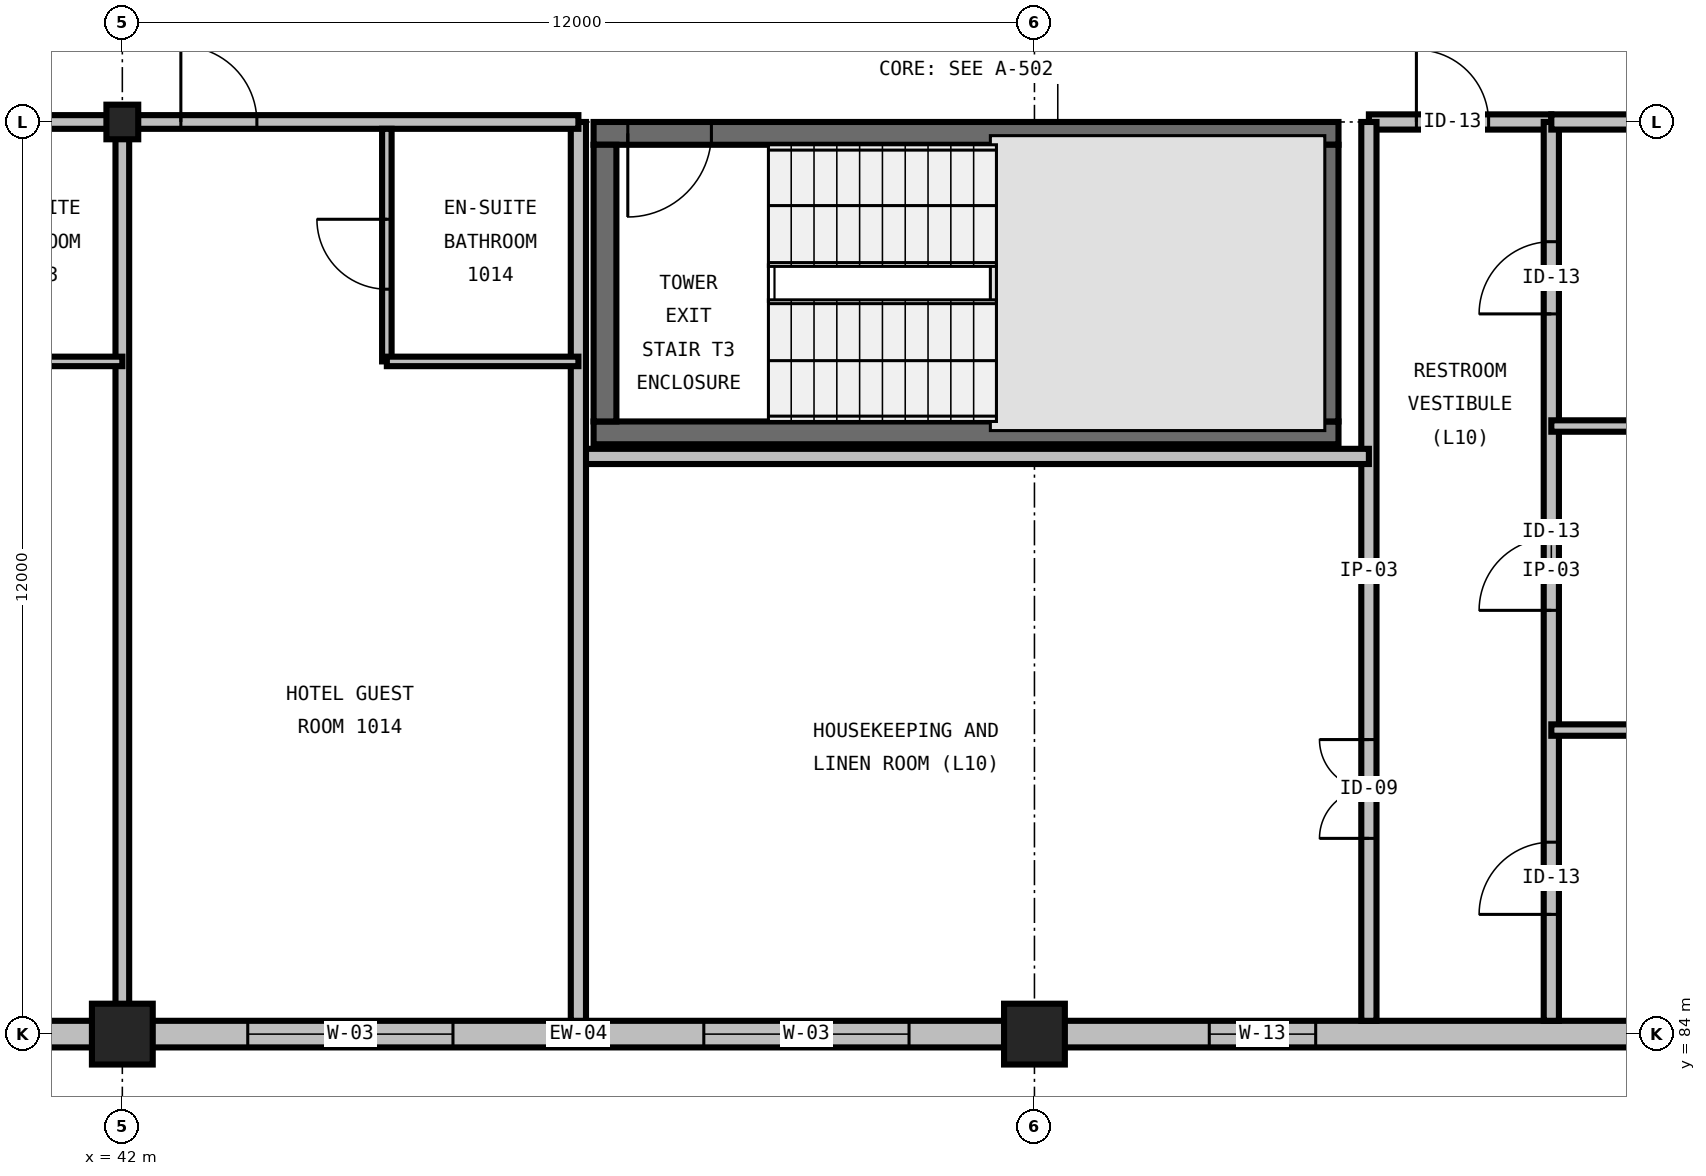
"""IFC4 building model, lengths in metres.
Left out: names, types, materials, properties, quantities, classifications, styles, units other than length and angle.
Written with IfcOpenShell. Run it as: python <this file> out.ifc"""

import sys

from ifc_helpers import new_model, si_unit, direction, frame, frame_2d, origin, origin_2d, place, context, subcontext, project, spatial, rectangle, i_section, extrude, element, fill, save


model = new_model("IFC4")
c1 = context("Model", 3, precision=1e-05, world=origin(), true_north=direction((0.0, 1.0)))
c2 = subcontext(c1, "Body", "Model", "MODEL_VIEW")
j1 = project(units=[si_unit("LENGTHUNIT", "METRE"), si_unit("PLANEANGLEUNIT", "RADIAN")], contexts=[c1])
p1 = place(None, origin())
s1 = spatial("IfcSite", under=j1, at=p1, CompositionType="ELEMENT")
p2 = place(p1, origin())
s2 = spatial("IfcBuilding", under=s1, at=p2, CompositionType="ELEMENT")
p3 = place(p2, frame((0.0, 0.0, 45.6)))
s3 = spatial("IfcBuildingStorey", under=s2, at=p3, CompositionType="ELEMENT", Elevation=45.6)
p4 = place(p3, frame((42.0, 84.0, 0.0), z_axis=(0.0, 0.0, 1.0), x_axis=(1.0, 0.0, 0.0)))
e1 = element("IfcColumn", 1, at=p4, inside=s3, PredefinedType="COLUMN", context=c2, shape_type="SweptSolid", body=[
    extrude(rectangle(XDim=0.8, YDim=0.8, at=origin_2d()), origin(), (0.0, 0.0, 1.0), 3.6),
])
p5 = place(p3, frame((42.0, 96.0, 0.0), z_axis=(0.0, 0.0, 1.0), x_axis=(1.0, 0.0, 0.0)))
e2 = element("IfcColumn", 2, at=p5, inside=s3, PredefinedType="COLUMN", context=c2, shape_type="SweptSolid", body=[
    extrude(i_section(OverallWidth=0.419, OverallDepth=0.455, WebThickness=0.042, FlangeThickness=0.068, FilletRadius=0.031, at=origin_2d()), origin(), (0.0, 0.0, 1.0), 3.6),
])
p6 = place(p3, frame((54.0, 84.0, 0.0), z_axis=(0.0, 0.0, 1.0), x_axis=(1.0, 0.0, 0.0)))
e3 = element("IfcColumn", 3, at=p6, inside=s3, PredefinedType="COLUMN", context=c2, shape_type="SweptSolid", body=[
    extrude(rectangle(XDim=0.8, YDim=0.8, at=origin_2d()), origin(), (0.0, 0.0, 1.0), 3.6),
])
p7 = place(p3, frame((48.2, 91.91, 0.0), z_axis=(0.0, 0.0, 1.0), x_axis=(1.0, 0.0, 0.0)))
e4 = element("IfcWall", 4, at=p7, inside=s3, PredefinedType="SHEAR", context=c2, shape_type="SweptSolid", body=[
    extrude(rectangle(XDim=9.8, YDim=0.3, at=frame_2d((4.9, 0.0))), origin(), (0.0, 0.0, 1.0), 3.6),
])
p8 = place(p3, frame((58.0, 95.85, 0.0), z_axis=(0.0, 0.0, 1.0), x_axis=(-1.0, 0.0, 0.0)))
e5 = element("IfcWall", 5, at=p8, inside=s3, PredefinedType="SHEAR", context=c2, shape_type="SweptSolid", body=[
    extrude(rectangle(XDim=9.8, YDim=0.3, at=frame_2d((4.9, 0.0))), origin(), (0.0, 0.0, 1.0), 3.6),
])
p9 = place(p8, frame((8.25, 0.0, 0.0)))
e6 = element("IfcOpeningElement", 6, at=p9, cuts=e5, PredefinedType="OPENING", context=c2, shape_type="SweptSolid", body=[
    extrude(rectangle(XDim=1.1, YDim=2.2, at=frame_2d((0.55, 1.1))), frame((0.0, 0.165, 0.0), z_axis=(0.0, -1.0, 0.0), x_axis=(1.0, 0.0, 0.0)), (0.0, 0.0, 1.0), 0.33),
])
for number, where, z_axis, x_axis in (
    (7, (48.35, 95.7, 0.0), (0.0, 0.0, 1.0), (0.0, -1.0, 0.0)),
    (8, (57.85, 92.06, 0.0), (0.0, 0.0, 1.0), (0.0, 1.0, 0.0)),
):
    element("IfcWall", number, at=place(p3, frame(where, z_axis=z_axis, x_axis=x_axis)), inside=s3, PredefinedType="SHEAR", context=c2, shape_type="SweptSolid", body=[
        extrude(rectangle(XDim=3.64, YDim=0.3, at=frame_2d((1.82, 0.0))), origin(), (0.0, 0.0, 1.0), 3.6),
    ])
p10 = place(p3, frame((36.0, 84.0, 0.0), z_axis=(0.0, 0.0, 1.0), x_axis=(1.0, 0.0, 0.0)))
e9 = element("IfcWall", 9, at=p10, inside=s3, PredefinedType="STANDARD", context=c2, shape_type="SweptSolid", body=[
    extrude(rectangle(XDim=6.0, YDim=0.35, at=frame_2d((3.0, 0.0))), origin(), (0.0, 0.0, 1.0), 2.486),
])
p11 = place(p10, frame((1.65, 0.0, 0.72)))
e10 = element("IfcOpeningElement", 10, at=p11, cuts=e9, PredefinedType="OPENING", context=c2, shape_type="SweptSolid", body=[
    extrude(rectangle(XDim=2.7, YDim=1.65, at=frame_2d((1.35, 0.825))), frame((0.0, 0.19, 0.0), z_axis=(0.0, -1.0, 0.0), x_axis=(1.0, 0.0, 0.0)), (0.0, 0.0, 1.0), 0.38),
])
p12 = place(p3, frame((42.0, 84.0, 0.0), z_axis=(0.0, 0.0, 1.0), x_axis=(1.0, 0.0, 0.0)))
e11 = element("IfcWall", 11, at=p12, inside=s3, PredefinedType="STANDARD", context=c2, shape_type="SweptSolid", body=[
    extrude(rectangle(XDim=12.0, YDim=0.35, at=frame_2d((6.0, 0.0))), origin(), (0.0, 0.0, 1.0), 2.486),
])
p13 = place(p12, frame((1.65, 0.0, 0.72)))
e12 = element("IfcOpeningElement", 12, at=p13, cuts=e11, PredefinedType="OPENING", context=c2, shape_type="SweptSolid", body=[
    extrude(rectangle(XDim=2.7, YDim=1.65, at=frame_2d((1.35, 0.825))), frame((0.0, 0.19, 0.0), z_axis=(0.0, -1.0, 0.0), x_axis=(1.0, 0.0, 0.0)), (0.0, 0.0, 1.0), 0.38),
])
p14 = place(p12, frame((7.65, 0.0, 0.72)))
e13 = element("IfcOpeningElement", 13, at=p14, cuts=e11, PredefinedType="OPENING", context=c2, shape_type="SweptSolid", body=[
    extrude(rectangle(XDim=2.7, YDim=1.65, at=frame_2d((1.35, 0.825))), frame((0.0, 0.19, 0.0), z_axis=(0.0, -1.0, 0.0), x_axis=(1.0, 0.0, 0.0)), (0.0, 0.0, 1.0), 0.38),
])
p15 = place(p3, frame((54.0, 84.0, 0.0), z_axis=(0.0, 0.0, 1.0), x_axis=(1.0, 0.0, 0.0)))
e14 = element("IfcWall", 14, at=p15, inside=s3, PredefinedType="STANDARD", context=c2, shape_type="SweptSolid", body=[
    extrude(rectangle(XDim=12.0, YDim=0.35, at=frame_2d((6.0, 0.0))), origin(), (0.0, 0.0, 1.0), 2.486),
])
p16 = place(p15, frame((2.3, 0.0, 1.0)))
e15 = element("IfcOpeningElement", 15, at=p16, cuts=e14, PredefinedType="OPENING", context=c2, shape_type="SweptSolid", body=[
    extrude(rectangle(XDim=1.4, YDim=1.4, at=frame_2d((0.7, 0.7))), frame((0.0, 0.19, 0.0), z_axis=(0.0, -1.0, 0.0), x_axis=(1.0, 0.0, 0.0)), (0.0, 0.0, 1.0), 0.38),
])
p17 = place(p15, frame((8.25, 0.0, 1.0)))
e16 = element("IfcOpeningElement", 16, at=p17, cuts=e14, PredefinedType="OPENING", context=c2, shape_type="SweptSolid", body=[
    extrude(rectangle(XDim=1.5, YDim=1.35, at=frame_2d((0.75, 0.675))), frame((0.0, 0.19, 0.0), z_axis=(0.0, -1.0, 0.0), x_axis=(1.0, 0.0, 0.0)), (0.0, 0.0, 1.0), 0.38),
])
p18 = place(p3, frame((58.4, 96.0, 0.0), z_axis=(0.0, 0.0, 1.0), x_axis=(1.0, 0.0, 0.0)))
e17 = element("IfcWall", 17, at=p18, inside=s3, PredefinedType="PARTITIONING", context=c2, shape_type="SweptSolid", body=[
    extrude(rectangle(XDim=2.4, YDim=0.2, at=frame_2d((1.2, 0.0))), origin(), (0.0, 0.0, 1.0), 2.359),
])
p19 = place(p18, frame((0.625, 0.0, 0.0)))
e18 = element("IfcOpeningElement", 18, at=p19, cuts=e17, PredefinedType="OPENING", context=c2, shape_type="SweptSolid", body=[
    extrude(rectangle(XDim=0.95, YDim=2.15, at=frame_2d((0.475, 1.075))), frame((0.0, 0.115, 0.0), z_axis=(0.0, -1.0, 0.0), x_axis=(1.0, 0.0, 0.0)), (0.0, 0.0, 1.0), 0.23),
])
p20 = place(p3, frame((58.4, 84.175, 0.0), z_axis=(0.0, 0.0, 1.0), x_axis=(0.0, 1.0, 0.0)))
e19 = element("IfcWall", 19, at=p20, inside=s3, PredefinedType="PARTITIONING", context=c2, shape_type="SweptSolid", body=[
    extrude(rectangle(XDim=11.825, YDim=0.2, at=frame_2d((5.913, 0.0))), origin(), (0.0, 0.0, 1.0), 3.29),
])
p21 = place(p20, frame((2.4, 0.0, 0.0)))
e20 = element("IfcOpeningElement", 20, at=p21, cuts=e19, PredefinedType="OPENING", context=c2, shape_type="SweptSolid", body=[
    extrude(rectangle(XDim=1.3, YDim=2.2, at=frame_2d((0.65, 1.1))), frame((0.0, 0.115, 0.0), z_axis=(0.0, -1.0, 0.0), x_axis=(1.0, 0.0, 0.0)), (0.0, 0.0, 1.0), 0.23),
])
p22 = place(p3, frame((60.8, 84.175, 0.0), z_axis=(0.0, 0.0, 1.0), x_axis=(0.0, 1.0, 0.0)))
e21 = element("IfcWall", 21, at=p22, inside=s3, PredefinedType="PARTITIONING", context=c2, shape_type="SweptSolid", body=[
    extrude(rectangle(XDim=11.825, YDim=0.2, at=frame_2d((5.913, 0.0))), origin(), (0.0, 0.0, 1.0), 3.29),
])
p23 = place(p22, frame((1.4, 0.0, 0.0)))
e22 = element("IfcOpeningElement", 22, at=p23, cuts=e21, PredefinedType="OPENING", context=c2, shape_type="SweptSolid", body=[
    extrude(rectangle(XDim=0.95, YDim=2.15, at=frame_2d((0.475, 1.075))), frame((0.0, 0.115, 0.0), z_axis=(0.0, -1.0, 0.0), x_axis=(1.0, 0.0, 0.0)), (0.0, 0.0, 1.0), 0.23),
])
p24 = place(p22, frame((5.4, 0.0, 0.0)))
e23 = element("IfcOpeningElement", 23, at=p24, cuts=e21, PredefinedType="OPENING", context=c2, shape_type="SweptSolid", body=[
    extrude(rectangle(XDim=0.95, YDim=2.15, at=frame_2d((0.475, 1.075))), frame((0.0, 0.115, 0.0), z_axis=(0.0, -1.0, 0.0), x_axis=(1.0, 0.0, 0.0)), (0.0, 0.0, 1.0), 0.23),
])
p25 = place(p22, frame((9.3, 0.0, 0.0)))
e24 = element("IfcOpeningElement", 24, at=p25, cuts=e21, PredefinedType="OPENING", context=c2, shape_type="SweptSolid", body=[
    extrude(rectangle(XDim=0.95, YDim=2.15, at=frame_2d((0.475, 1.075))), frame((0.0, 0.115, 0.0), z_axis=(0.0, -1.0, 0.0), x_axis=(1.0, 0.0, 0.0)), (0.0, 0.0, 1.0), 0.23),
])
p26 = place(p3, frame((60.8, 96.0, 0.0), z_axis=(0.0, 0.0, 1.0), x_axis=(1.0, 0.0, 0.0)))
e25 = element("IfcWall", 25, at=p26, inside=s3, PredefinedType="PARTITIONING", context=c2, shape_type="SweptSolid", body=[
    extrude(rectangle(XDim=5.2, YDim=0.2, at=frame_2d((2.6, 0.0))), origin(), (0.0, 0.0, 1.0), 2.359),
])
for number, where, z_axis, x_axis in (
    (26, (60.8, 88.0, 0.0), (0.0, 0.0, 1.0), (1.0, 0.0, 0.0)),
    (27, (60.8, 92.0, 0.0), (0.0, 0.0, 1.0), (1.0, 0.0, 0.0)),
):
    element("IfcWall", number, at=place(p3, frame(where, z_axis=z_axis, x_axis=x_axis)), inside=s3, PredefinedType="PARTITIONING", context=c2, shape_type="SweptSolid", body=[
        extrude(rectangle(XDim=5.2, YDim=0.15, at=frame_2d((2.6, 0.0))), origin(), (0.0, 0.0, 1.0), 3.29),
    ])
p27 = place(p3, frame((48.0, 91.6, 0.0), z_axis=(0.0, 0.0, 1.0), x_axis=(1.0, 0.0, 0.0)))
e28 = element("IfcWall", 28, at=p27, inside=s3, PredefinedType="PARTITIONING", context=c2, shape_type="SweptSolid", body=[
    extrude(rectangle(XDim=10.4, YDim=0.2, at=frame_2d((5.2, 0.0))), origin(), (0.0, 0.0, 1.0), 3.29),
])
p28 = place(p3, frame((48.0, 84.175, 0.0), z_axis=(0.0, 0.0, 1.0), x_axis=(0.0, 1.0, 0.0)))
e29 = element("IfcWall", 29, at=p28, inside=s3, PredefinedType="PARTITIONING", context=c2, shape_type="SweptSolid", body=[
    extrude(rectangle(XDim=11.825, YDim=0.2, at=frame_2d((5.913, 0.0))), origin(), (0.0, 0.0, 1.0), 3.29),
])
p29 = place(p3, frame((36.0, 96.0, 0.0), z_axis=(0.0, 0.0, 1.0), x_axis=(1.0, 0.0, 0.0)))
e30 = element("IfcWall", 30, at=p29, inside=s3, PredefinedType="PARTITIONING", context=c2, shape_type="SweptSolid", body=[
    extrude(rectangle(XDim=6.0, YDim=0.18, at=frame_2d((3.0, 0.0))), origin(), (0.0, 0.0, 1.0), 2.736),
])
p30 = place(p29, frame((0.77, 0.0, 0.0)))
e31 = element("IfcOpeningElement", 31, at=p30, cuts=e30, PredefinedType="OPENING", context=c2, shape_type="SweptSolid", body=[
    extrude(rectangle(XDim=1.0, YDim=2.15, at=frame_2d((0.5, 1.075))), frame((0.0, 0.105, 0.0), z_axis=(0.0, -1.0, 0.0), x_axis=(1.0, 0.0, 0.0)), (0.0, 0.0, 1.0), 0.21),
])
p31 = place(p3, frame((42.0, 84.175, 0.0), z_axis=(0.0, 0.0, 1.0), x_axis=(0.0, 1.0, 0.0)))
e32 = element("IfcWall", 32, at=p31, inside=s3, PredefinedType="PARTITIONING", context=c2, shape_type="SweptSolid", body=[
    extrude(rectangle(XDim=11.825, YDim=0.18, at=frame_2d((5.913, 0.0))), origin(), (0.0, 0.0, 1.0), 2.59),
])
p32 = place(p3, frame((39.48, 92.85, 0.0), z_axis=(0.0, 0.0, 1.0), x_axis=(1.0, 0.0, 0.0)))
e33 = element("IfcWall", 33, at=p32, inside=s3, PredefinedType="PARTITIONING", context=c2, shape_type="SweptSolid", body=[
    extrude(rectangle(XDim=2.52, YDim=0.125, at=frame_2d((1.26, 0.0))), origin(), (0.0, 0.0, 1.0), 3.29),
])
p33 = place(p3, frame((42.0, 96.0, 0.0), z_axis=(0.0, 0.0, 1.0), x_axis=(1.0, 0.0, 0.0)))
e34 = element("IfcWall", 34, at=p33, inside=s3, PredefinedType="PARTITIONING", context=c2, shape_type="SweptSolid", body=[
    extrude(rectangle(XDim=6.0, YDim=0.18, at=frame_2d((3.0, 0.0))), origin(), (0.0, 0.0, 1.0), 2.359),
])
p34 = place(p33, frame((0.77, 0.0, 0.0)))
e35 = element("IfcOpeningElement", 35, at=p34, cuts=e34, PredefinedType="OPENING", context=c2, shape_type="SweptSolid", body=[
    extrude(rectangle(XDim=1.0, YDim=2.15, at=frame_2d((0.5, 1.075))), frame((0.0, 0.105, 0.0), z_axis=(0.0, -1.0, 0.0), x_axis=(1.0, 0.0, 0.0)), (0.0, 0.0, 1.0), 0.21),
])
p35 = place(p3, frame((45.48, 92.85, 0.0), z_axis=(0.0, 0.0, 1.0), x_axis=(0.0, 1.0, 0.0)))
e36 = element("IfcWall", 36, at=p35, inside=s3, PredefinedType="PARTITIONING", context=c2, shape_type="SweptSolid", body=[
    extrude(rectangle(XDim=3.06, YDim=0.125, at=frame_2d((1.53, 0.0))), origin(), (0.0, 0.0, 1.0), 3.29),
])
p36 = place(p35, frame((0.95, 0.0, 0.0)))
e37 = element("IfcOpeningElement", 37, at=p36, cuts=e36, PredefinedType="OPENING", context=c2, shape_type="SweptSolid", body=[
    extrude(rectangle(XDim=0.92, YDim=2.1, at=frame_2d((0.46, 1.05))), frame((0.0, 0.077, 0.0), z_axis=(0.0, -1.0, 0.0), x_axis=(1.0, 0.0, 0.0)), (0.0, 0.0, 1.0), 0.155),
])
p37 = place(p3, frame((45.48, 92.85, 0.0), z_axis=(0.0, 0.0, 1.0), x_axis=(1.0, 0.0, 0.0)))
e38 = element("IfcWall", 38, at=p37, inside=s3, PredefinedType="PARTITIONING", context=c2, shape_type="SweptSolid", body=[
    extrude(rectangle(XDim=2.52, YDim=0.125, at=frame_2d((1.26, 0.0))), origin(), (0.0, 0.0, 1.0), 3.29),
])
p38 = place(p9, origin())
e39 = element("IfcDoor", 39, at=p38, inside=s3, OperationType="SINGLE_SWING_RIGHT", PredefinedType="DOOR", context=c2, shape_type="SweptSolid", body=[
    extrude(rectangle(XDim=1.1, YDim=2.2, at=frame_2d((0.55, 1.1))), frame((0.0, 0.025, 0.0), z_axis=(0.0, -1.0, 0.0), x_axis=(1.0, 0.0, 0.0)), (0.0, 0.0, 1.0), 0.05),
])
fill(e6, e39)
p39 = place(p13, origin())
e40 = element("IfcWindow", 40, at=p39, inside=s3, PartitioningType="TRIPLE_PANEL_VERTICAL", PredefinedType="WINDOW", context=c2, shape_type="SweptSolid", body=[
    extrude(rectangle(XDim=2.7, YDim=1.65, at=frame_2d((1.35, 0.825))), frame((0.0, 0.03, 0.0), z_axis=(0.0, -1.0, 0.0), x_axis=(1.0, 0.0, 0.0)), (0.0, 0.0, 1.0), 0.06),
])
fill(e12, e40)
p40 = place(p14, origin())
e41 = element("IfcWindow", 41, at=p40, inside=s3, PartitioningType="TRIPLE_PANEL_VERTICAL", PredefinedType="WINDOW", context=c2, shape_type="SweptSolid", body=[
    extrude(rectangle(XDim=2.7, YDim=1.65, at=frame_2d((1.35, 0.825))), frame((0.0, 0.03, 0.0), z_axis=(0.0, -1.0, 0.0), x_axis=(1.0, 0.0, 0.0)), (0.0, 0.0, 1.0), 0.06),
])
fill(e13, e41)
p41 = place(p16, origin())
e42 = element("IfcWindow", 42, at=p41, inside=s3, PartitioningType="SINGLE_PANEL", PredefinedType="WINDOW", context=c2, shape_type="SweptSolid", body=[
    extrude(rectangle(XDim=1.4, YDim=1.4, at=frame_2d((0.7, 0.7))), frame((0.0, 0.03, 0.0), z_axis=(0.0, -1.0, 0.0), x_axis=(1.0, 0.0, 0.0)), (0.0, 0.0, 1.0), 0.06),
])
fill(e15, e42)
p42 = place(p19, origin())
e43 = element("IfcDoor", 43, at=p42, inside=s3, OperationType="SINGLE_SWING_LEFT", PredefinedType="DOOR", context=c2, shape_type="SweptSolid", body=[
    extrude(rectangle(XDim=0.95, YDim=2.15, at=frame_2d((0.475, 1.075))), frame((0.0, 0.025, 0.0), z_axis=(0.0, -1.0, 0.0), x_axis=(1.0, 0.0, 0.0)), (0.0, 0.0, 1.0), 0.05),
])
fill(e18, e43)
p43 = place(p21, origin())
e44 = element("IfcDoor", 44, at=p43, inside=s3, OperationType="DOUBLE_DOOR_SINGLE_SWING", PredefinedType="DOOR", context=c2, shape_type="SweptSolid", body=[
    extrude(rectangle(XDim=1.3, YDim=2.2, at=frame_2d((0.65, 1.1))), frame((0.0, 0.025, 0.0), z_axis=(0.0, -1.0, 0.0), x_axis=(1.0, 0.0, 0.0)), (0.0, 0.0, 1.0), 0.05),
])
fill(e20, e44)
p44 = place(p23, origin())
e45 = element("IfcDoor", 45, at=p44, inside=s3, OperationType="SINGLE_SWING_LEFT", PredefinedType="DOOR", context=c2, shape_type="SweptSolid", body=[
    extrude(rectangle(XDim=0.95, YDim=2.15, at=frame_2d((0.475, 1.075))), frame((0.0, 0.025, 0.0), z_axis=(0.0, -1.0, 0.0), x_axis=(1.0, 0.0, 0.0)), (0.0, 0.0, 1.0), 0.05),
])
fill(e22, e45)
p45 = place(p24, origin())
e46 = element("IfcDoor", 46, at=p45, inside=s3, OperationType="SINGLE_SWING_LEFT", PredefinedType="DOOR", context=c2, shape_type="SweptSolid", body=[
    extrude(rectangle(XDim=0.95, YDim=2.15, at=frame_2d((0.475, 1.075))), frame((0.0, 0.025, 0.0), z_axis=(0.0, -1.0, 0.0), x_axis=(1.0, 0.0, 0.0)), (0.0, 0.0, 1.0), 0.05),
])
fill(e23, e46)
p46 = place(p25, origin())
e47 = element("IfcDoor", 47, at=p46, inside=s3, OperationType="SINGLE_SWING_LEFT", PredefinedType="DOOR", context=c2, shape_type="SweptSolid", body=[
    extrude(rectangle(XDim=0.95, YDim=2.15, at=frame_2d((0.475, 1.075))), frame((0.0, 0.025, 0.0), z_axis=(0.0, -1.0, 0.0), x_axis=(1.0, 0.0, 0.0)), (0.0, 0.0, 1.0), 0.05),
])
fill(e24, e47)
p47 = place(p34, origin())
e48 = element("IfcDoor", 48, at=p47, inside=s3, OperationType="SINGLE_SWING_LEFT", PredefinedType="DOOR", context=c2, shape_type="SweptSolid", body=[
    extrude(rectangle(XDim=1.0, YDim=2.15, at=frame_2d((0.5, 1.075))), frame((0.0, 0.025, 0.0), z_axis=(0.0, -1.0, 0.0), x_axis=(1.0, 0.0, 0.0)), (0.0, 0.0, 1.0), 0.05),
])
fill(e35, e48)
p48 = place(p36, origin())
e49 = element("IfcDoor", 49, at=p48, inside=s3, OperationType="SINGLE_SWING_RIGHT", PredefinedType="DOOR", context=c2, shape_type="SweptSolid", body=[
    extrude(rectangle(XDim=0.92, YDim=2.1, at=frame_2d((0.46, 1.05))), frame((0.0, 0.025, 0.0), z_axis=(0.0, -1.0, 0.0), x_axis=(1.0, 0.0, 0.0)), (0.0, 0.0, 1.0), 0.05),
])
fill(e37, e49)
save(model, sys.argv[1])
